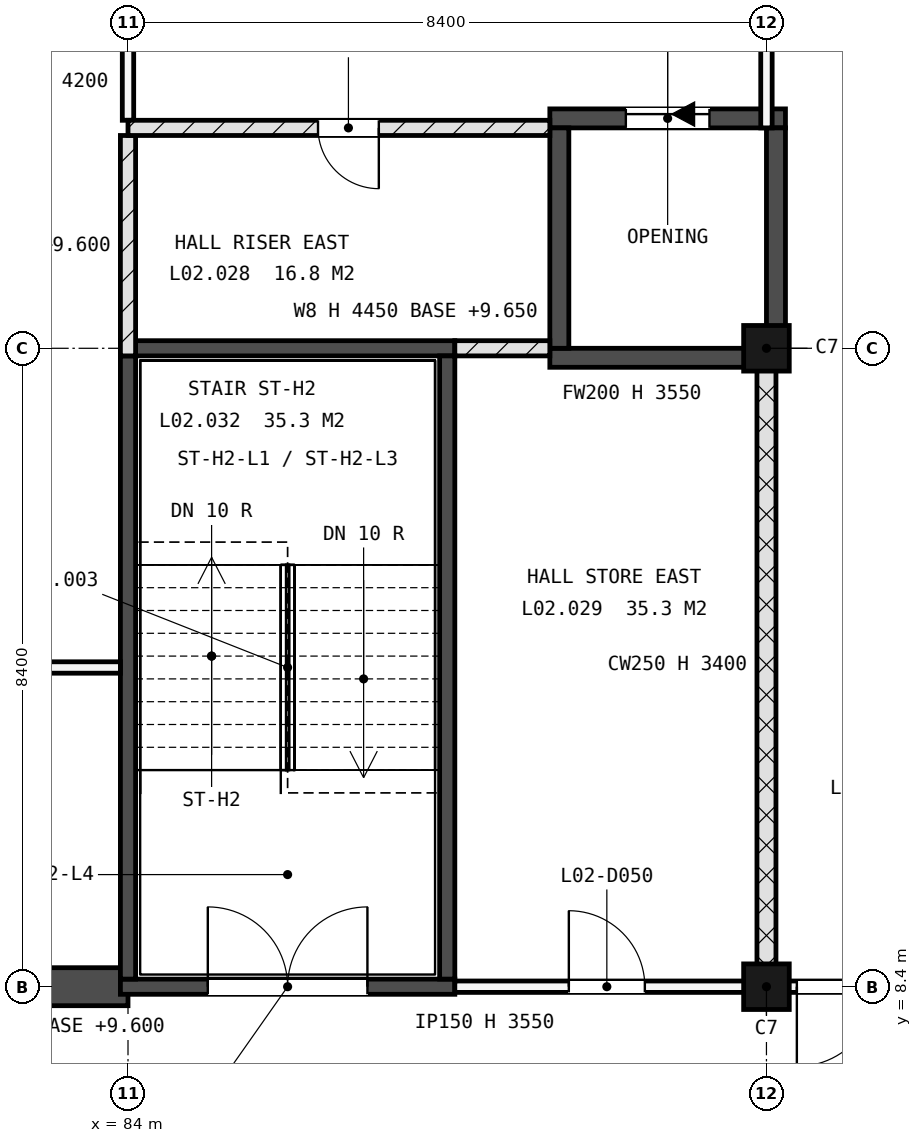
"""IFC4 building model, lengths in metres.
Left out: names, types, materials, properties, quantities, classifications, styles, units other than length and angle.
Written with IfcOpenShell. Run it as: python <this file> out.ifc"""

import sys

from ifc_helpers import new_model, si_unit, direction, frame, frame_2d, origin, origin_2d, place, context, subcontext, project, spatial, rectangle, extrude, element, fill, save


model = new_model("IFC4")
c1 = context("Model", 3, precision=1e-05, world=origin(), true_north=direction((0.0, 1.0)))
c2 = subcontext(c1, "Body", "Model", "MODEL_VIEW")
j1 = project(units=[si_unit("LENGTHUNIT", "METRE"), si_unit("PLANEANGLEUNIT", "RADIAN")], contexts=[c1])
p1 = place(None, origin())
s1 = spatial("IfcSite", under=j1, at=p1, CompositionType="ELEMENT")
p2 = place(p1, origin())
s2 = spatial("IfcBuilding", under=s1, at=p2, CompositionType="ELEMENT")
p3 = place(p2, frame((0.0, 0.0, 9.9)))
s3 = spatial("IfcBuildingStorey", under=s2, at=p3, CompositionType="ELEMENT", Elevation=9.9)
for number, where, z_axis, x_axis in (
    (1, (92.4, 8.4, -0.25), (0.0, 0.0, 1.0), (1.0, 0.0, 0.0)),
    (2, (92.4, 16.8, -0.25), (0.0, 0.0, 1.0), (1.0, 0.0, 0.0)),
):
    element("IfcColumn", number, at=place(p3, frame(where, z_axis=z_axis, x_axis=x_axis)), inside=s3, PredefinedType="COLUMN", context=c2, shape_type="SweptSolid", body=[
        extrude(rectangle(XDim=0.6, YDim=0.6, at=origin_2d()), origin(), (0.0, 0.0, 1.0), 4.45),
    ])
p4 = place(p3, frame((89.55, 16.675, -0.25), z_axis=(0.0, 0.0, 1.0), x_axis=(1.0, 0.0, 0.0)))
e3 = element("IfcWall", 3, at=p4, inside=s3, PredefinedType="SHEAR", context=c2, shape_type="SweptSolid", body=[
    extrude(rectangle(XDim=3.1, YDim=0.25, at=frame_2d((1.55, 0.0))), origin(), (0.0, 0.0, 1.0), 4.45),
])
p5 = place(p3, frame((89.55, 19.825, -0.25), z_axis=(0.0, 0.0, 1.0), x_axis=(1.0, 0.0, 0.0)))
e4 = element("IfcWall", 4, at=p5, inside=s3, PredefinedType="SHEAR", context=c2, shape_type="SweptSolid", body=[
    extrude(rectangle(XDim=3.1, YDim=0.25, at=frame_2d((1.55, 0.0))), origin(), (0.0, 0.0, 1.0), 4.45),
])
p6 = place(p5, frame((1.0, 0.0, 0.25)))
e5 = element("IfcOpeningElement", 5, at=p6, cuts=e4, PredefinedType="OPENING", context=c2, shape_type="SweptSolid", body=[
    extrude(rectangle(XDim=1.1, YDim=2.1, at=frame_2d((0.55, 1.05))), frame((0.0, 0.135, 0.0), z_axis=(0.0, -1.0, 0.0), x_axis=(1.0, 0.0, 0.0)), (0.0, 0.0, 1.0), 0.27),
])
for number, where, z_axis, x_axis in (
    (6, (89.675, 16.8, -0.25), (0.0, 0.0, 1.0), (0.0, 1.0, 0.0)),
    (7, (92.525, 16.8, -0.25), (0.0, 0.0, 1.0), (0.0, 1.0, 0.0)),
):
    element("IfcWall", number, at=place(p3, frame(where, z_axis=z_axis, x_axis=x_axis)), inside=s3, PredefinedType="SHEAR", context=c2, shape_type="SweptSolid", body=[
        extrude(rectangle(XDim=2.9, YDim=0.25, at=frame_2d((1.45, 0.0))), origin(), (0.0, 0.0, 1.0), 4.45),
    ])
p7 = place(p3, frame((42.0, 8.4, -0.25), z_axis=(0.0, 0.0, 1.0), x_axis=(1.0, 0.0, 0.0)))
e8 = element("IfcWall", 8, at=p7, inside=s3, PredefinedType="SHEAR", context=c2, shape_type="SweptSolid", body=[
    extrude(rectangle(XDim=42.0, YDim=0.5, at=frame_2d((21.0, 0.0))), origin(), (0.0, 0.0, 1.0), 4.45),
])
p8 = place(p3, frame((83.9, 8.4, -0.3), z_axis=(0.0, 0.0, 1.0), x_axis=(1.0, 0.0, 0.0)))
e9 = element("IfcWall", 9, at=p8, inside=s3, PredefinedType="SHEAR", context=c2, shape_type="SweptSolid", body=[
    extrude(rectangle(XDim=4.4, YDim=0.2, at=frame_2d((2.2, 0.0))), origin(), (0.0, 0.0, 1.0), 4.5),
])
p9 = place(p8, frame((1.15, 0.0, 0.3)))
e10 = element("IfcOpeningElement", 10, at=p9, cuts=e9, PredefinedType="OPENING", context=c2, shape_type="SweptSolid", body=[
    extrude(rectangle(XDim=2.1, YDim=2.1, at=frame_2d((1.05, 1.05))), frame((0.0, 0.11, 0.0), z_axis=(0.0, -1.0, 0.0), x_axis=(1.0, 0.0, 0.0)), (0.0, 0.0, 1.0), 0.22),
])
p10 = place(p3, frame((83.9, 16.8, -0.3), z_axis=(0.0, 0.0, 1.0), x_axis=(1.0, 0.0, 0.0)))
e11 = element("IfcWall", 11, at=p10, inside=s3, PredefinedType="SHEAR", context=c2, shape_type="SweptSolid", body=[
    extrude(rectangle(XDim=4.4, YDim=0.2, at=frame_2d((2.2, 0.0))), origin(), (0.0, 0.0, 1.0), 4.5),
])
for number, where, z_axis, x_axis in (
    (12, (84.0, 8.5, -0.3), (0.0, 0.0, 1.0), (0.0, 1.0, 0.0)),
    (13, (88.2, 8.5, -0.3), (0.0, 0.0, 1.0), (0.0, 1.0, 0.0)),
):
    element("IfcWall", number, at=place(p3, frame(where, z_axis=z_axis, x_axis=x_axis)), inside=s3, PredefinedType="SHEAR", context=c2, shape_type="SweptSolid", body=[
        extrude(rectangle(XDim=8.2, YDim=0.2, at=frame_2d((4.1, 0.0))), origin(), (0.0, 0.0, 1.0), 4.5),
    ])
p11 = place(p3, frame((41.875, 12.6, -0.3), z_axis=(0.0, 0.0, 1.0), x_axis=(1.0, 0.0, 0.0)))
e14 = element("IfcWall", 14, at=p11, inside=s3, PredefinedType="PARTITIONING", context=c2, shape_type="SweptSolid", body=[
    extrude(rectangle(XDim=42.025, YDim=0.15, at=frame_2d((21.012, 0.0))), origin(), (0.0, 0.0, 1.0), 4.5),
])
p12 = place(p3, frame((84.0, 16.7, -0.3), z_axis=(0.0, 0.0, 1.0), x_axis=(0.0, 1.0, 0.0)))
e15 = element("IfcWall", 15, at=p12, inside=s3, PredefinedType="SOLIDWALL", context=c2, shape_type="SweptSolid", body=[
    extrude(rectangle(XDim=2.9, YDim=0.2, at=frame_2d((1.45, 0.0))), origin(), (0.0, 0.0, 1.0), 3.7),
])
p13 = place(p3, frame((84.0, 19.8, -0.3), z_axis=(0.0, 0.0, 1.0), x_axis=(0.0, 1.0, 0.0)))
e16 = element("IfcWall", 16, at=p13, inside=s3, PredefinedType="PARTITIONING", context=c2, shape_type="SweptSolid", body=[
    extrude(rectangle(XDim=17.925, YDim=0.15, at=frame_2d((8.962, 0.0))), origin(), (0.0, 0.0, 1.0), 3.7),
])
p14 = place(p3, frame((88.3, 8.4, 0.0), z_axis=(0.0, 0.0, 1.0), x_axis=(1.0, 0.0, 0.0)))
e17 = element("IfcWall", 17, at=p14, inside=s3, PredefinedType="PARTITIONING", context=c2, shape_type="SweptSolid", body=[
    extrude(rectangle(XDim=3.9, YDim=0.15, at=frame_2d((1.95, 0.0))), origin(), (0.0, 0.0, 1.0), 3.55),
])
p15 = place(p14, frame((1.5, 0.0, 0.0)))
e18 = element("IfcOpeningElement", 18, at=p15, cuts=e17, PredefinedType="OPENING", context=c2, shape_type="SweptSolid", body=[
    extrude(rectangle(XDim=1.0, YDim=2.1, at=frame_2d((0.5, 1.05))), frame((0.0, 0.085, 0.0), z_axis=(0.0, -1.0, 0.0), x_axis=(1.0, 0.0, 0.0)), (0.0, 0.0, 1.0), 0.17),
])
p16 = place(p3, frame((92.2, 8.4, 0.0), z_axis=(0.0, 0.0, 1.0), x_axis=(1.0, 0.0, 0.0)))
e19 = element("IfcWall", 19, at=p16, inside=s3, PredefinedType="PARTITIONING", context=c2, shape_type="SweptSolid", body=[
    extrude(rectangle(XDim=75.8, YDim=0.15, at=frame_2d((37.9, 0.0))), origin(), (0.0, 0.0, 1.0), 3.4),
])
p17 = place(p16, frame((0.6, 0.0, 0.0)))
e20 = element("IfcOpeningElement", 20, at=p17, cuts=e19, PredefinedType="OPENING", context=c2, shape_type="SweptSolid", body=[
    extrude(rectangle(XDim=2.1, YDim=2.1, at=frame_2d((1.05, 1.05))), frame((0.0, 0.085, 0.0), z_axis=(0.0, -1.0, 0.0), x_axis=(1.0, 0.0, 0.0)), (0.0, 0.0, 1.0), 0.17),
])
p18 = place(p16, frame((22.9, 0.0, 0.0)))
e21 = element("IfcOpeningElement", 21, at=p18, cuts=e19, PredefinedType="OPENING", context=c2, shape_type="SweptSolid", body=[
    extrude(rectangle(XDim=2.1, YDim=2.1, at=frame_2d((1.05, 1.05))), frame((0.0, 0.085, 0.0), z_axis=(0.0, -1.0, 0.0), x_axis=(1.0, 0.0, 0.0)), (0.0, 0.0, 1.0), 0.17),
])
p19 = place(p16, frame((25.8, 0.0, 0.0)))
e22 = element("IfcOpeningElement", 22, at=p19, cuts=e19, PredefinedType="OPENING", context=c2, shape_type="SweptSolid", body=[
    extrude(rectangle(XDim=1.2, YDim=2.1, at=frame_2d((0.6, 1.05))), frame((0.0, 0.085, 0.0), z_axis=(0.0, -1.0, 0.0), x_axis=(1.0, 0.0, 0.0)), (0.0, 0.0, 1.0), 0.17),
])
p20 = place(p16, frame((40.5, 0.0, 0.0)))
e23 = element("IfcOpeningElement", 23, at=p20, cuts=e19, PredefinedType="OPENING", context=c2, shape_type="SweptSolid", body=[
    extrude(rectangle(XDim=1.2, YDim=2.1, at=frame_2d((0.6, 1.05))), frame((0.0, 0.085, 0.0), z_axis=(0.0, -1.0, 0.0), x_axis=(1.0, 0.0, 0.0)), (0.0, 0.0, 1.0), 0.17),
])
p21 = place(p16, frame((42.7, 0.0, 0.0)))
e24 = element("IfcOpeningElement", 24, at=p21, cuts=e19, PredefinedType="OPENING", context=c2, shape_type="SweptSolid", body=[
    extrude(rectangle(XDim=1.2, YDim=2.1, at=frame_2d((0.6, 1.05))), frame((0.0, 0.085, 0.0), z_axis=(0.0, -1.0, 0.0), x_axis=(1.0, 0.0, 0.0)), (0.0, 0.0, 1.0), 0.17),
])
p22 = place(p16, frame((57.3, 0.0, 0.0)))
e25 = element("IfcOpeningElement", 25, at=p22, cuts=e19, PredefinedType="OPENING", context=c2, shape_type="SweptSolid", body=[
    extrude(rectangle(XDim=1.2, YDim=2.1, at=frame_2d((0.6, 1.05))), frame((0.0, 0.085, 0.0), z_axis=(0.0, -1.0, 0.0), x_axis=(1.0, 0.0, 0.0)), (0.0, 0.0, 1.0), 0.17),
])
p23 = place(p16, frame((67.8, 0.0, 0.0)))
e26 = element("IfcOpeningElement", 26, at=p23, cuts=e19, PredefinedType="OPENING", context=c2, shape_type="SweptSolid", body=[
    extrude(rectangle(XDim=1.2, YDim=2.1, at=frame_2d((0.6, 1.05))), frame((0.0, 0.085, 0.0), z_axis=(0.0, -1.0, 0.0), x_axis=(1.0, 0.0, 0.0)), (0.0, 0.0, 1.0), 0.17),
])
p24 = place(p3, frame((88.3, 16.8, 0.0), z_axis=(0.0, 0.0, 1.0), x_axis=(1.0, 0.0, 0.0)))
e27 = element("IfcWall", 27, at=p24, inside=s3, PredefinedType="SOLIDWALL", context=c2, shape_type="SweptSolid", body=[
    extrude(rectangle(XDim=1.25, YDim=0.2, at=frame_2d((0.625, 0.0))), origin(), (0.0, 0.0, 1.0), 3.55),
])
p25 = place(p3, frame((84.0, 19.7, 0.0), z_axis=(0.0, 0.0, 1.0), x_axis=(1.0, 0.0, 0.0)))
e28 = element("IfcWall", 28, at=p25, inside=s3, PredefinedType="SOLIDWALL", context=c2, shape_type="SweptSolid", body=[
    extrude(rectangle(XDim=5.55, YDim=0.2, at=frame_2d((2.775, 0.0))), origin(), (0.0, 0.0, 1.0), 4.2),
])
p26 = place(p25, frame((2.5, 0.0, 0.0)))
e29 = element("IfcOpeningElement", 29, at=p26, cuts=e28, PredefinedType="OPENING", context=c2, shape_type="SweptSolid", body=[
    extrude(rectangle(XDim=0.8, YDim=2.1, at=frame_2d((0.4, 1.05))), frame((0.0, 0.11, 0.0), z_axis=(0.0, -1.0, 0.0), x_axis=(1.0, 0.0, 0.0)), (0.0, 0.0, 1.0), 0.22),
])
p27 = place(p3, frame((92.4, 8.475, 0.0), z_axis=(0.0, 0.0, 1.0), x_axis=(0.0, 1.0, 0.0)))
e30 = element("IfcWall", 30, at=p27, inside=s3, PredefinedType="SOLIDWALL", context=c2, shape_type="SweptSolid", body=[
    extrude(rectangle(XDim=8.325, YDim=0.25, at=frame_2d((4.163, 0.0))), origin(), (0.0, 0.0, 1.0), 3.4),
])
p28 = place(p3, frame((92.4, 19.7, 0.0), z_axis=(0.0, 0.0, 1.0), x_axis=(0.0, 1.0, 0.0)))
e31 = element("IfcWall", 31, at=p28, inside=s3, PredefinedType="PARTITIONING", context=c2, shape_type="SweptSolid", body=[
    extrude(rectangle(XDim=13.62, YDim=0.15, at=frame_2d((6.81, 0.0))), origin(), (0.0, 0.0, 1.0), 3.4),
])
p29 = place(p28, frame((12.5, 0.0, 0.0)))
e32 = element("IfcOpeningElement", 32, at=p29, cuts=e31, PredefinedType="OPENING", context=c2, shape_type="SweptSolid", body=[
    extrude(rectangle(XDim=1.0, YDim=2.1, at=frame_2d((0.5, 1.05))), frame((0.0, 0.085, 0.0), z_axis=(0.0, -1.0, 0.0), x_axis=(1.0, 0.0, 0.0)), (0.0, 0.0, 1.0), 0.17),
])
p30 = place(p6, origin())
e33 = element("IfcDoor", 33, at=p30, inside=s3, OperationType="SLIDING_TO_LEFT", PredefinedType="DOOR", context=c2, shape_type="SweptSolid", body=[
    extrude(rectangle(XDim=1.1, YDim=2.1, at=frame_2d((0.55, 1.05))), frame((0.0, 0.025, 0.0), z_axis=(0.0, -1.0, 0.0), x_axis=(1.0, 0.0, 0.0)), (0.0, 0.0, 1.0), 0.05),
])
fill(e5, e33)
p31 = place(p9, origin())
e34 = element("IfcDoor", 34, at=p31, inside=s3, OperationType="DOUBLE_DOOR_SINGLE_SWING", PredefinedType="DOOR", context=c2, shape_type="SweptSolid", body=[
    extrude(rectangle(XDim=2.1, YDim=2.1, at=frame_2d((1.05, 1.05))), frame((0.0, 0.025, 0.0), z_axis=(0.0, -1.0, 0.0), x_axis=(1.0, 0.0, 0.0)), (0.0, 0.0, 1.0), 0.05),
])
fill(e10, e34)
p32 = place(p26, origin())
e35 = element("IfcDoor", 35, at=p32, inside=s3, OperationType="SINGLE_SWING_RIGHT", PredefinedType="DOOR", context=c2, shape_type="SweptSolid", body=[
    extrude(rectangle(XDim=0.8, YDim=2.1, at=frame_2d((0.4, 1.05))), frame((0.0, 0.025, 0.0), z_axis=(0.0, -1.0, 0.0), x_axis=(1.0, 0.0, 0.0)), (0.0, 0.0, 1.0), 0.05),
])
fill(e29, e35)
p33 = place(p15, origin())
e36 = element("IfcDoor", 36, at=p33, inside=s3, OperationType="SINGLE_SWING_RIGHT", PredefinedType="DOOR", context=c2, shape_type="SweptSolid", body=[
    extrude(rectangle(XDim=1.0, YDim=2.1, at=frame_2d((0.5, 1.05))), frame((0.0, 0.025, 0.0), z_axis=(0.0, -1.0, 0.0), x_axis=(1.0, 0.0, 0.0)), (0.0, 0.0, 1.0), 0.05),
])
fill(e18, e36)
p34 = place(p17, origin())
e37 = element("IfcDoor", 37, at=p34, inside=s3, OperationType="DOUBLE_DOOR_SINGLE_SWING", PredefinedType="DOOR", context=c2, shape_type="SweptSolid", body=[
    extrude(rectangle(XDim=2.1, YDim=2.1, at=frame_2d((1.05, 1.05))), frame((0.0, 0.025, 0.0), z_axis=(0.0, -1.0, 0.0), x_axis=(1.0, 0.0, 0.0)), (0.0, 0.0, 1.0), 0.05),
])
fill(e20, e37)
save(model, sys.argv[1])
